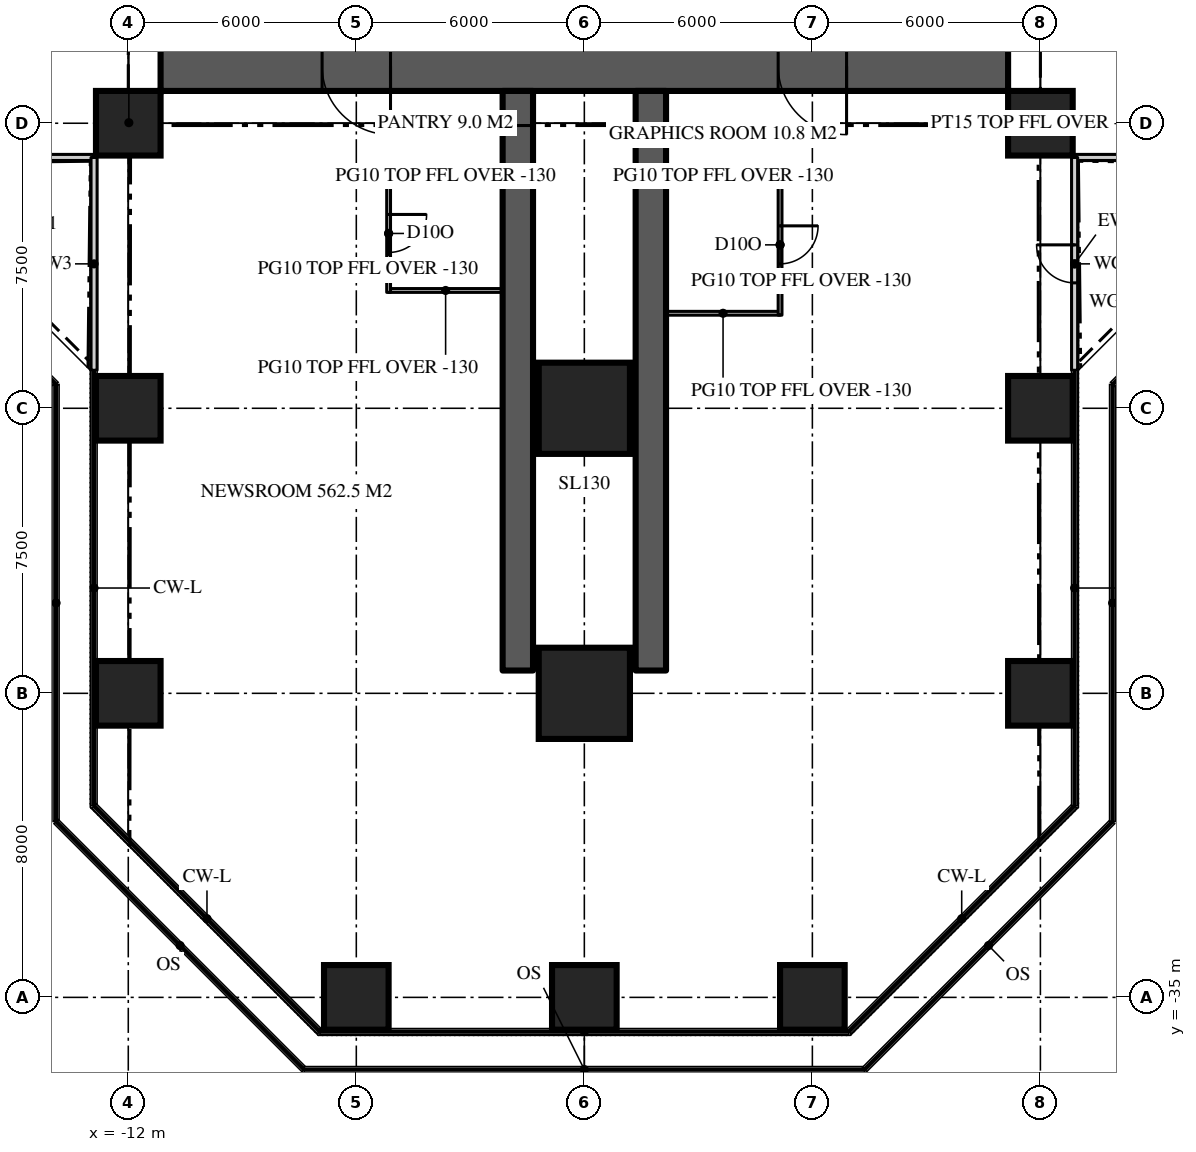
"""IFC4 building model, lengths in metres.
Left out: names, types, materials, properties, quantities, classifications, styles, units other than length and angle.
Written with IfcOpenShell. Run it as: python <this file> out.ifc"""

import sys

from ifc_helpers import new_model, si_unit, direction, frame, frame_2d, origin, origin_2d, place, context, subcontext, project, spatial, rectangle, extrude, element, fill, save


model = new_model("IFC4")
c1 = context("Model", 3, precision=1e-05, world=origin(), true_north=direction((0.0, 1.0)))
c2 = subcontext(c1, "Body", "Model", "MODEL_VIEW")
j1 = project(units=[si_unit("LENGTHUNIT", "METRE"), si_unit("PLANEANGLEUNIT", "RADIAN")], contexts=[c1])
p1 = place(None, origin())
s1 = spatial("IfcSite", under=j1, at=p1, CompositionType="ELEMENT")
p2 = place(p1, origin())
s2 = spatial("IfcBuilding", under=s1, at=p2, CompositionType="ELEMENT")
p3 = place(p2, frame((0.0, 0.0, 51.3)))
s3 = spatial("IfcBuildingStorey", under=s2, at=p3, CompositionType="ELEMENT", Elevation=51.3)
p4 = place(p3, frame((11.15, -10.5, 0.0), z_axis=(0.0, 0.0, 1.0), x_axis=(-1.0, 0.0, 0.0)))
e1 = element("IfcWall", 1, at=p4, inside=s3, PredefinedType="SHEAR", context=c2, shape_type="SweptSolid", body=[
    extrude(rectangle(XDim=22.3, YDim=1.3, at=frame_2d((11.15, 0.0))), origin(), (0.0, 0.0, 1.0), 3.9),
])
p5 = place(p4, frame((16.25, 0.0, 0.0)))
e2 = element("IfcOpeningElement", 2, at=p5, cuts=e1, PredefinedType="OPENING", context=c2, shape_type="SweptSolid", body=[
    extrude(rectangle(XDim=1.8, YDim=2.2, at=frame_2d((0.9, 1.1))), frame((0.0, 0.66, 0.0), z_axis=(0.0, -1.0, 0.0), x_axis=(1.0, 0.0, 0.0)), (0.0, 0.0, 1.0), 1.32),
])
p6 = place(p4, frame((4.25, 0.0, 0.0)))
e3 = element("IfcOpeningElement", 3, at=p6, cuts=e1, PredefinedType="OPENING", context=c2, shape_type="SweptSolid", body=[
    extrude(rectangle(XDim=1.8, YDim=2.2, at=frame_2d((0.9, 1.1))), frame((0.0, 0.66, 0.0), z_axis=(0.0, -1.0, 0.0), x_axis=(1.0, 0.0, 0.0)), (0.0, 0.0, 1.0), 1.32),
])
for number, where, z_axis, x_axis in (
    (4, (-1.75, -11.15, 0.0), (0.0, 0.0, 1.0), (0.0, -1.0, 0.0)),
    (5, (1.75, -11.15, 0.0), (0.0, 0.0, 1.0), (0.0, -1.0, 0.0)),
):
    element("IfcWall", number, at=place(p3, frame(where, z_axis=z_axis, x_axis=x_axis)), inside=s3, PredefinedType="SHEAR", context=c2, shape_type="SweptSolid", body=[
        extrude(rectangle(XDim=15.25, YDim=0.8, at=frame_2d((7.625, 0.0))), origin(), (0.0, 0.0, 1.0), 3.9),
    ])
for number, where, z_axis, x_axis in (
    (6, (-6.0, -35.0, 0.0), (0.0, 0.0, 1.0), (1.0, 0.0, 0.0)),
    (7, (0.0, -35.0, 0.0), (0.0, 0.0, 1.0), (1.0, 0.0, 0.0)),
    (8, (6.0, -35.0, 0.0), (0.0, 0.0, 1.0), (1.0, 0.0, 0.0)),
    (9, (-12.0, -27.0, 0.0), (0.0, 0.0, 1.0), (1.0, 0.0, 0.0)),
):
    element("IfcColumn", number, at=place(p3, frame(where, z_axis=z_axis, x_axis=x_axis)), inside=s3, PredefinedType="COLUMN", context=c2, shape_type="SweptSolid", body=[
        extrude(rectangle(XDim=1.7, YDim=1.7, at=origin_2d()), origin(), (0.0, 0.0, 1.0), 3.9),
    ])
p7 = place(p3, frame((0.0, -27.0, 0.0), z_axis=(0.0, 0.0, 1.0), x_axis=(1.0, 0.0, 0.0)))
e10 = element("IfcColumn", 10, at=p7, inside=s3, PredefinedType="COLUMN", context=c2, shape_type="SweptSolid", body=[
    extrude(rectangle(XDim=2.4, YDim=2.4, at=origin_2d()), origin(), (0.0, 0.0, 1.0), 3.9),
])
for number, where, z_axis, x_axis in (
    (11, (12.0, -27.0, 0.0), (0.0, 0.0, 1.0), (1.0, 0.0, 0.0)),
    (12, (-12.0, -19.5, 0.0), (0.0, 0.0, 1.0), (1.0, 0.0, 0.0)),
):
    element("IfcColumn", number, at=place(p3, frame(where, z_axis=z_axis, x_axis=x_axis)), inside=s3, PredefinedType="COLUMN", context=c2, shape_type="SweptSolid", body=[
        extrude(rectangle(XDim=1.7, YDim=1.7, at=origin_2d()), origin(), (0.0, 0.0, 1.0), 3.9),
    ])
p8 = place(p3, frame((0.0, -19.5, 0.0), z_axis=(0.0, 0.0, 1.0), x_axis=(1.0, 0.0, 0.0)))
e13 = element("IfcColumn", 13, at=p8, inside=s3, PredefinedType="COLUMN", context=c2, shape_type="SweptSolid", body=[
    extrude(rectangle(XDim=2.4, YDim=2.4, at=origin_2d()), origin(), (0.0, 0.0, 1.0), 3.9),
])
for number, where, z_axis, x_axis in (
    (14, (12.0, -19.5, 0.0), (0.0, 0.0, 1.0), (1.0, 0.0, 0.0)),
    (15, (-12.0, -12.0, 0.0), (0.0, 0.0, 1.0), (1.0, 0.0, 0.0)),
    (16, (12.0, -12.0, 0.0), (0.0, 0.0, 1.0), (1.0, 0.0, 0.0)),
):
    element("IfcColumn", number, at=place(p3, frame(where, z_axis=z_axis, x_axis=x_axis)), inside=s3, PredefinedType="COLUMN", context=c2, shape_type="SweptSolid", body=[
        extrude(rectangle(XDim=1.7, YDim=1.7, at=origin_2d()), origin(), (0.0, 0.0, 1.0), 3.9),
    ])
p9 = place(p3, frame((12.9, -12.9, 0.0), z_axis=(0.0, 0.0, 1.0), x_axis=(1.0, 0.0, 0.0)))
e17 = element("IfcWall", 17, at=p9, inside=s3, PredefinedType="SOLIDWALL", context=c2, shape_type="SweptSolid", body=[
    extrude(rectangle(XDim=5.6, YDim=0.16, at=frame_2d((2.8, 0.0))), origin(), (0.0, 0.0, 1.0), 3.77),
])
p10 = place(p3, frame((-18.5, -12.9, 0.0), z_axis=(0.0, 0.0, 1.0), x_axis=(1.0, 0.0, 0.0)))
e18 = element("IfcWall", 18, at=p10, inside=s3, PredefinedType="SOLIDWALL", context=c2, shape_type="SweptSolid", body=[
    extrude(rectangle(XDim=5.6, YDim=0.16, at=frame_2d((2.8, 0.0))), origin(), (0.0, 0.0, 1.0), 3.77),
])
p11 = place(p10, frame((2.3, 0.0, 0.0)))
e19 = element("IfcOpeningElement", 19, at=p11, cuts=e18, PredefinedType="OPENING", context=c2, shape_type="SweptSolid", body=[
    extrude(rectangle(XDim=1.0, YDim=2.2, at=frame_2d((0.5, 1.1))), frame((0.0, 0.09, 0.0), z_axis=(0.0, -1.0, 0.0), x_axis=(1.0, 0.0, 0.0)), (0.0, 0.0, 1.0), 0.18),
])
p12 = place(p3, frame((-12.9, -12.9, 0.0), z_axis=(0.0, 0.0, 1.0), x_axis=(0.0, -1.0, 0.0)))
e20 = element("IfcWall", 20, at=p12, inside=s3, PredefinedType="SOLIDWALL", context=c2, shape_type="SweptSolid", body=[
    extrude(rectangle(XDim=5.6, YDim=0.16, at=frame_2d((2.8, 0.0))), origin(), (0.0, 0.0, 1.0), 3.77),
])
p13 = place(p3, frame((12.9, -18.5, 0.0), z_axis=(0.0, 0.0, 1.0), x_axis=(0.0, 1.0, 0.0)))
e21 = element("IfcWall", 21, at=p13, inside=s3, PredefinedType="SOLIDWALL", context=c2, shape_type="SweptSolid", body=[
    extrude(rectangle(XDim=5.6, YDim=0.16, at=frame_2d((2.8, 0.0))), origin(), (0.0, 0.0, 1.0), 3.77),
])
p14 = place(p13, frame((2.3, 0.0, 0.0)))
e22 = element("IfcOpeningElement", 22, at=p14, cuts=e21, PredefinedType="OPENING", context=c2, shape_type="SweptSolid", body=[
    extrude(rectangle(XDim=1.0, YDim=2.2, at=frame_2d((0.5, 1.1))), frame((0.0, 0.09, 0.0), z_axis=(0.0, -1.0, 0.0), x_axis=(1.0, 0.0, 0.0)), (0.0, 0.0, 1.0), 0.18),
])
for number, where, z_axis, x_axis in (
    (23, (2.15, -13.4, 0.0), (0.0, 0.0, 1.0), (1.0, 0.0, 0.0)),
    (24, (2.15, -17.0, 0.0), (0.0, 0.0, 1.0), (1.0, 0.0, 0.0)),
):
    element("IfcWall", number, at=place(p3, frame(where, z_axis=z_axis, x_axis=x_axis)), inside=s3, PredefinedType="PARTITIONING", context=c2, shape_type="SweptSolid", body=[
        extrude(rectangle(XDim=3.0, YDim=0.1, at=frame_2d((1.5, 0.0))), origin(), (0.0, 0.0, 1.0), 3.77),
    ])
p15 = place(p3, frame((5.15, -13.35, 0.0), z_axis=(0.0, 0.0, 1.0), x_axis=(0.0, -1.0, 0.0)))
e25 = element("IfcWall", 25, at=p15, inside=s3, PredefinedType="PARTITIONING", context=c2, shape_type="SweptSolid", body=[
    extrude(rectangle(XDim=3.7, YDim=0.1, at=frame_2d((1.85, 0.0))), origin(), (0.0, 0.0, 1.0), 3.77),
])
p16 = place(p15, frame((1.35, 0.0, 0.0)))
e26 = element("IfcOpeningElement", 26, at=p16, cuts=e25, PredefinedType="OPENING", context=c2, shape_type="SweptSolid", body=[
    extrude(rectangle(XDim=1.0, YDim=2.2, at=frame_2d((0.5, 1.1))), frame((0.0, 0.06, 0.0), z_axis=(0.0, -1.0, 0.0), x_axis=(1.0, 0.0, 0.0)), (0.0, 0.0, 1.0), 0.12),
])
for number, where, z_axis, x_axis in (
    (27, (-2.15, -13.4, 0.0), (0.0, 0.0, 1.0), (-1.0, 0.0, 0.0)),
    (28, (-2.15, -16.4, 0.0), (0.0, 0.0, 1.0), (-1.0, 0.0, 0.0)),
):
    element("IfcWall", number, at=place(p3, frame(where, z_axis=z_axis, x_axis=x_axis)), inside=s3, PredefinedType="PARTITIONING", context=c2, shape_type="SweptSolid", body=[
        extrude(rectangle(XDim=3.0, YDim=0.1, at=frame_2d((1.5, 0.0))), origin(), (0.0, 0.0, 1.0), 3.77),
    ])
p17 = place(p3, frame((-5.15, -13.35, 0.0), z_axis=(0.0, 0.0, 1.0), x_axis=(0.0, -1.0, 0.0)))
e29 = element("IfcWall", 29, at=p17, inside=s3, PredefinedType="PARTITIONING", context=c2, shape_type="SweptSolid", body=[
    extrude(rectangle(XDim=3.1, YDim=0.1, at=frame_2d((1.55, 0.0))), origin(), (0.0, 0.0, 1.0), 3.77),
])
p18 = place(p17, frame((1.05, 0.0, 0.0)))
e30 = element("IfcOpeningElement", 30, at=p18, cuts=e29, PredefinedType="OPENING", context=c2, shape_type="SweptSolid", body=[
    extrude(rectangle(XDim=1.0, YDim=2.2, at=frame_2d((0.5, 1.1))), frame((0.0, 0.06, 0.0), z_axis=(0.0, -1.0, 0.0), x_axis=(1.0, 0.0, 0.0)), (0.0, 0.0, 1.0), 0.12),
])
for number, where, z_axis, x_axis in (
    (31, (-11.15, -11.15, 0.0), (0.0, 0.0, 1.0), (-0.707, -0.707, 0.0)),
    (32, (11.15, -11.15, 0.0), (0.0, 0.0, 1.0), (0.707, -0.707, 0.0)),
):
    element("IfcWall", number, at=place(p3, frame(where, z_axis=z_axis, x_axis=x_axis)), inside=s3, PredefinedType="PARTITIONING", context=c2, shape_type="SweptSolid", body=[
        extrude(rectangle(XDim=2.362, YDim=0.15, at=frame_2d((1.181, 0.0))), origin(), (0.0, 0.0, 1.0), 3.22),
    ])
p19 = place(p14, origin())
e33 = element("IfcDoor", 33, at=p19, inside=s3, OperationType="SINGLE_SWING_RIGHT", PredefinedType="DOOR", context=c2, shape_type="SweptSolid", body=[
    extrude(rectangle(XDim=1.0, YDim=2.2, at=frame_2d((0.5, 1.1))), frame((0.0, 0.025, 0.0), z_axis=(0.0, -1.0, 0.0), x_axis=(1.0, 0.0, 0.0)), (0.0, 0.0, 1.0), 0.05),
])
fill(e22, e33)
p20 = place(p5, origin())
e34 = element("IfcDoor", 34, at=p20, inside=s3, OperationType="DOUBLE_DOOR_DOUBLE_SWING", PredefinedType="DOOR", context=c2, shape_type="SweptSolid", body=[
    extrude(rectangle(XDim=1.8, YDim=2.2, at=frame_2d((0.9, 1.1))), frame((0.0, 0.025, 0.0), z_axis=(0.0, -1.0, 0.0), x_axis=(1.0, 0.0, 0.0)), (0.0, 0.0, 1.0), 0.05),
])
fill(e2, e34)
p21 = place(p6, origin())
e35 = element("IfcDoor", 35, at=p21, inside=s3, OperationType="DOUBLE_DOOR_DOUBLE_SWING", PredefinedType="DOOR", context=c2, shape_type="SweptSolid", body=[
    extrude(rectangle(XDim=1.8, YDim=2.2, at=frame_2d((0.9, 1.1))), frame((0.0, 0.025, 0.0), z_axis=(0.0, -1.0, 0.0), x_axis=(1.0, 0.0, 0.0)), (0.0, 0.0, 1.0), 0.05),
])
fill(e3, e35)
p22 = place(p16, origin())
e36 = element("IfcDoor", 36, at=p22, inside=s3, OperationType="SINGLE_SWING_LEFT", PredefinedType="DOOR", context=c2, shape_type="SweptSolid", body=[
    extrude(rectangle(XDim=1.0, YDim=2.2, at=frame_2d((0.5, 1.1))), frame((0.0, 0.025, 0.0), z_axis=(0.0, -1.0, 0.0), x_axis=(1.0, 0.0, 0.0)), (0.0, 0.0, 1.0), 0.05),
])
fill(e26, e36)
p23 = place(p18, origin())
e37 = element("IfcDoor", 37, at=p23, inside=s3, OperationType="SINGLE_SWING_LEFT", PredefinedType="DOOR", context=c2, shape_type="SweptSolid", body=[
    extrude(rectangle(XDim=1.0, YDim=2.2, at=frame_2d((0.5, 1.1))), frame((0.0, 0.025, 0.0), z_axis=(0.0, -1.0, 0.0), x_axis=(1.0, 0.0, 0.0)), (0.0, 0.0, 1.0), 0.05),
])
fill(e30, e37)
save(model, sys.argv[1])
